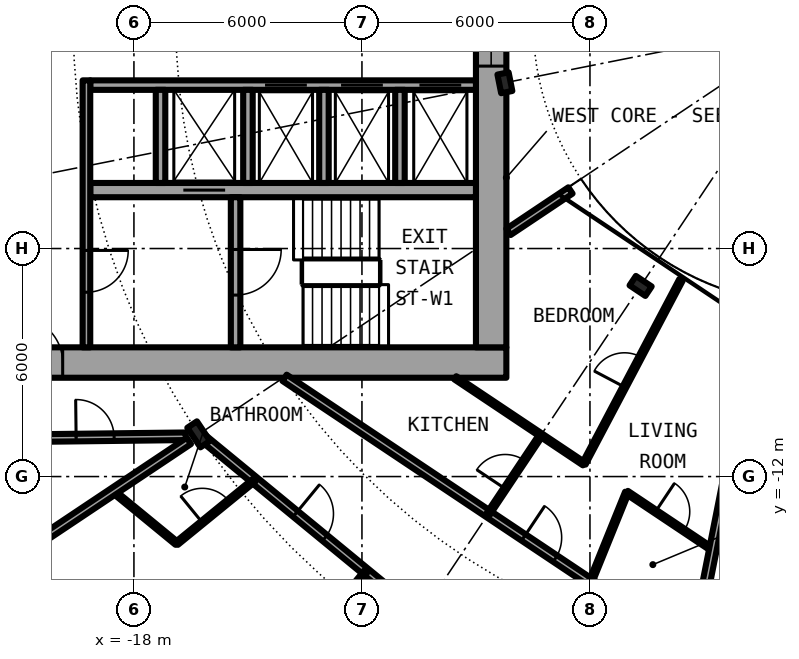
"""IFC4 building model, lengths in metres.
Left out: names, types, materials, properties, quantities, classifications, styles, units other than length and angle.
Written with IfcOpenShell. Run it as: python <this file> out.ifc"""

import sys

from ifc_helpers import new_model, si_unit, direction, frame, frame_2d, origin, origin_2d, place, context, subcontext, project, spatial, rectangle, i_section, extrude, element, fill, save


model = new_model("IFC4")
c1 = context("Model", 3, precision=1e-05, world=origin(), true_north=direction((0.0, 1.0)))
c2 = subcontext(c1, "Body", "Model", "MODEL_VIEW")
j1 = project(units=[si_unit("LENGTHUNIT", "METRE"), si_unit("PLANEANGLEUNIT", "RADIAN")], contexts=[c1])
p1 = place(None, origin())
s1 = spatial("IfcSite", under=j1, at=p1, CompositionType="ELEMENT")
p2 = place(p1, origin())
s2 = spatial("IfcBuilding", under=s1, at=p2, CompositionType="ELEMENT")
p3 = place(p2, frame((0.0, 0.0, 35.0)))
s3 = spatial("IfcBuildingStorey", under=s2, at=p3, CompositionType="ELEMENT", Elevation=35.0)
p4 = place(p3, frame((-16.297, -10.889, 0.0), z_axis=(0.0, 0.0, 1.0), x_axis=(-0.831469612303, -0.55557023302, 0.0)))
e1 = element("IfcColumn", 1, at=p4, inside=s3, PredefinedType="COLUMN", context=c2, shape_type="SweptSolid", body=[
    extrude(i_section(OverallWidth=0.305, OverallDepth=0.62, WebThickness=0.021, FlangeThickness=0.04, FilletRadius=0.027, at=origin_2d()), origin(), (0.0, 0.0, 1.0), 3.05),
])
for number, where, z_axis, x_axis in (
    (2, (-8.239, -1.639, 0.0), (0.0, 0.0, 1.0), (-0.981, -0.195, 0.0)),
    (3, (-4.667, -6.984, 0.0), (0.0, 0.0, 1.0), (-0.556, -0.831, 0.0)),
):
    element("IfcColumn", number, at=place(p3, frame(where, z_axis=z_axis, x_axis=x_axis)), inside=s3, PredefinedType="COLUMN", context=c2, shape_type="SweptSolid", body=[
        extrude(i_section(OverallWidth=0.3, OverallDepth=0.5, WebThickness=0.014, FlangeThickness=0.028, FilletRadius=0.027, at=origin_2d()), origin(), (0.0, 0.0, 1.0), 3.05),
    ])
p5 = place(p3, frame((-22.4, -9.0, 0.0), z_axis=(0.0, 0.0, 1.0), x_axis=(1.0, 0.0, 0.0)))
e4 = element("IfcWall", 4, at=p5, inside=s3, PredefinedType="SHEAR", context=c2, shape_type="SweptSolid", body=[
    extrude(rectangle(XDim=14.2, YDim=0.8, at=frame_2d((7.1, 0.0))), origin(), (0.0, 0.0, 1.0), 3.05),
])
p6 = place(p5, frame((1.325, 0.0, 0.0)))
e5 = element("IfcOpeningElement", 5, at=p6, cuts=e4, PredefinedType="OPENING", context=c2, shape_type="SweptSolid", body=[
    extrude(rectangle(XDim=1.2, YDim=2.3, at=frame_2d((0.6, 1.15))), frame((0.0, 0.41, 0.0), z_axis=(0.0, -1.0, 0.0), x_axis=(1.0, 0.0, 0.0)), (0.0, 0.0, 1.0), 0.82),
])
p7 = place(p3, frame((-8.6, 8.6, 0.0), z_axis=(0.0, 0.0, 1.0), x_axis=(0.0, -1.0, 0.0)))
e6 = element("IfcWall", 6, at=p7, inside=s3, PredefinedType="SHEAR", context=c2, shape_type="SweptSolid", body=[
    extrude(rectangle(XDim=17.2, YDim=0.8, at=frame_2d((8.6, 0.0))), origin(), (0.0, 0.0, 1.0), 3.05),
])
p8 = place(p7, frame((7.4, 0.0, 0.1)))
e7 = element("IfcOpeningElement", 7, at=p8, cuts=e6, PredefinedType="OPENING", context=c2, shape_type="SweptSolid", body=[
    extrude(rectangle(XDim=2.4, YDim=2.2, at=frame_2d((1.2, 1.1))), frame((0.0, 0.41, 0.0), z_axis=(0.0, -1.0, 0.0), x_axis=(1.0, 0.0, 0.0)), (0.0, 0.0, 1.0), 0.82),
])
p9 = place(p3, frame((-9.0, -1.7, 0.0), z_axis=(0.0, 0.0, 1.0), x_axis=(-1.0, 0.0, 0.0)))
e8 = element("IfcWall", 8, at=p9, inside=s3, PredefinedType="SHEAR", context=c2, shape_type="SweptSolid", body=[
    extrude(rectangle(XDim=10.15, YDim=0.25, at=frame_2d((5.075, 0.0))), origin(), (0.0, 0.0, 1.0), 3.05),
])
p10 = place(p9, frame((0.387, 0.0, 0.0)))
e9 = element("IfcOpeningElement", 9, at=p10, cuts=e8, PredefinedType="OPENING", context=c2, shape_type="SweptSolid", body=[
    extrude(rectangle(XDim=1.1, YDim=2.3, at=frame_2d((0.55, 1.15))), frame((0.0, 0.135, 0.0), z_axis=(0.0, -1.0, 0.0), x_axis=(1.0, 0.0, 0.0)), (0.0, 0.0, 1.0), 0.27),
])
p11 = place(p9, frame((2.45, 0.0, 0.0)))
e10 = element("IfcOpeningElement", 10, at=p11, cuts=e8, PredefinedType="OPENING", context=c2, shape_type="SweptSolid", body=[
    extrude(rectangle(XDim=1.1, YDim=2.3, at=frame_2d((0.55, 1.15))), frame((0.0, 0.135, 0.0), z_axis=(0.0, -1.0, 0.0), x_axis=(1.0, 0.0, 0.0)), (0.0, 0.0, 1.0), 0.27),
])
p12 = place(p9, frame((4.45, 0.0, 0.0)))
e11 = element("IfcOpeningElement", 11, at=p12, cuts=e8, PredefinedType="OPENING", context=c2, shape_type="SweptSolid", body=[
    extrude(rectangle(XDim=1.1, YDim=2.3, at=frame_2d((0.55, 1.15))), frame((0.0, 0.135, 0.0), z_axis=(0.0, -1.0, 0.0), x_axis=(1.0, 0.0, 0.0)), (0.0, 0.0, 1.0), 0.27),
])
p13 = place(p3, frame((-9.0, -4.462, 0.0), z_axis=(0.0, 0.0, 1.0), x_axis=(-1.0, 0.0, 0.0)))
e12 = element("IfcWall", 12, at=p13, inside=s3, PredefinedType="SHEAR", context=c2, shape_type="SweptSolid", body=[
    extrude(rectangle(XDim=10.15, YDim=0.375, at=frame_2d((5.075, 0.0))), origin(), (0.0, 0.0, 1.0), 3.05),
])
p14 = place(p13, frame((6.6, 0.0, 0.0)))
e13 = element("IfcOpeningElement", 13, at=p14, cuts=e12, PredefinedType="OPENING", context=c2, shape_type="SweptSolid", body=[
    extrude(rectangle(XDim=1.1, YDim=2.3, at=frame_2d((0.55, 1.15))), frame((0.0, 0.198, 0.0), z_axis=(0.0, -1.0, 0.0), x_axis=(1.0, 0.0, 0.0)), (0.0, 0.0, 1.0), 0.395),
])
p15 = place(p3, frame((-15.325, -4.65, 0.0), z_axis=(0.0, 0.0, 1.0), x_axis=(0.0, -1.0, 0.0)))
e14 = element("IfcWall", 14, at=p15, inside=s3, PredefinedType="SHEAR", context=c2, shape_type="SweptSolid", body=[
    extrude(rectangle(XDim=3.95, YDim=0.25, at=frame_2d((1.975, 0.0))), origin(), (0.0, 0.0, 1.0), 3.05),
])
p16 = place(p15, frame((1.375, 0.0, 0.0)))
e15 = element("IfcOpeningElement", 15, at=p16, cuts=e14, PredefinedType="OPENING", context=c2, shape_type="SweptSolid", body=[
    extrude(rectangle(XDim=1.2, YDim=2.3, at=frame_2d((0.6, 1.15))), frame((0.0, 0.135, 0.0), z_axis=(0.0, -1.0, 0.0), x_axis=(1.0, 0.0, 0.0)), (0.0, 0.0, 1.0), 0.27),
])
for number, where, z_axis, x_axis in (
    (16, (-15.0, -1.825, 0.0), (0.0, 0.0, 1.0), (0.0, -1.0, 0.0)),
    (17, (-17.3, -1.825, 0.0), (0.0, 0.0, 1.0), (0.0, -1.0, 0.0)),
):
    element("IfcWall", number, at=place(p3, frame(where, z_axis=z_axis, x_axis=x_axis)), inside=s3, PredefinedType="SOLIDWALL", context=c2, shape_type="SweptSolid", body=[
        extrude(rectangle(XDim=2.45, YDim=0.25, at=frame_2d((1.225, 0.0))), origin(), (0.0, 0.0, 1.0), 2.7),
    ])
p17 = place(p3, frame((-19.25, -1.575, 0.0), z_axis=(0.0, 0.0, 1.0), x_axis=(0.0, -1.0, 0.0)))
e18 = element("IfcWall", 18, at=p17, inside=s3, PredefinedType="SOLIDWALL", context=c2, shape_type="SweptSolid", body=[
    extrude(rectangle(XDim=7.025, YDim=0.2, at=frame_2d((3.513, 0.0))), origin(), (0.0, 0.0, 1.0), 2.7),
])
p18 = place(p17, frame((4.475, 0.0, 0.0)))
e19 = element("IfcOpeningElement", 19, at=p18, cuts=e18, PredefinedType="OPENING", context=c2, shape_type="SweptSolid", body=[
    extrude(rectangle(XDim=1.1, YDim=2.3, at=frame_2d((0.55, 1.15))), frame((0.0, 0.11, 0.0), z_axis=(0.0, -1.0, 0.0), x_axis=(1.0, 0.0, 0.0)), (0.0, 0.0, 1.0), 0.22),
])
for number, where, z_axis, x_axis in (
    (20, (-11.0, -1.825, 0.0), (0.0, 0.0, 1.0), (0.0, -1.0, 0.0)),
    (21, (-13.0, -1.825, 0.0), (0.0, 0.0, 1.0), (0.0, -1.0, 0.0)),
):
    element("IfcWall", number, at=place(p3, frame(where, z_axis=z_axis, x_axis=x_axis)), inside=s3, PredefinedType="SOLIDWALL", context=c2, shape_type="SweptSolid", body=[
        extrude(rectangle(XDim=2.45, YDim=0.25, at=frame_2d((1.225, 0.0))), origin(), (0.0, 0.0, 1.0), 2.7),
    ])
p19 = place(p3, frame((-18.542, -12.389, 0.0), z_axis=(0.0, 0.0, 1.0), x_axis=(0.772948171844, -0.634469166818, 0.0)))
e22 = element("IfcWall", 22, at=p19, inside=s3, PredefinedType="PARTITIONING", context=c2, shape_type="SweptSolid", body=[
    extrude(rectangle(XDim=2.158, YDim=0.1, at=frame_2d((1.079, 0.0))), origin(), (0.0, 0.0, 1.0), 2.7),
])
p20 = place(p3, frame((-16.173, -10.99, 0.0), z_axis=(0.0, 0.0, 1.0), x_axis=(0.772704887747, -0.634765434198, 0.0)))
e23 = element("IfcWall", 23, at=p20, inside=s3, PredefinedType="PARTITIONING", context=c2, shape_type="SweptSolid", body=[
    extrude(rectangle(XDim=11.209, YDim=0.2, at=frame_2d((5.604, 0.0))), origin(), (0.0, 0.0, 1.0), 2.38),
])
p21 = place(p20, frame((3.137, 0.0, 0.0)))
e24 = element("IfcOpeningElement", 24, at=p21, cuts=e23, PredefinedType="OPENING", context=c2, shape_type="SweptSolid", body=[
    extrude(rectangle(XDim=1.0, YDim=2.3, at=frame_2d((0.5, 1.15))), frame((0.0, 0.11, 0.0), z_axis=(0.0, -1.0, 0.0), x_axis=(1.0, 0.0, 0.0)), (0.0, 0.0, 1.0), 0.22),
])
p22 = place(p3, frame((-14.036, -9.402, 0.0), z_axis=(0.0, 0.0, 1.0), x_axis=(0.831561346449, -0.555432918625, 0.0)))
e25 = element("IfcWall", 25, at=p22, inside=s3, PredefinedType="PARTITIONING", context=c2, shape_type="SweptSolid", body=[
    extrude(rectangle(XDim=12.914, YDim=0.2, at=frame_2d((6.457, 0.0))), origin(), (0.0, 0.0, 1.0), 2.7),
])
p23 = place(p22, frame((7.566, 0.0, 0.0)))
e26 = element("IfcOpeningElement", 26, at=p23, cuts=e25, PredefinedType="OPENING", context=c2, shape_type="SweptSolid", body=[
    extrude(rectangle(XDim=1.0, YDim=2.3, at=frame_2d((0.5, 1.15))), frame((0.0, 0.11, 0.0), z_axis=(0.0, -1.0, 0.0), x_axis=(1.0, 0.0, 0.0)), (0.0, 0.0, 1.0), 0.22),
])
p24 = place(p3, frame((-2.772, -13.927, 0.0), z_axis=(0.0, 0.0, 1.0), x_axis=(0.995206960104, 0.097791137432, 0.0)))
e27 = element("IfcWall", 27, at=p24, inside=s3, PredefinedType="PARTITIONING", context=c2, shape_type="SweptSolid", body=[
    extrude(rectangle(XDim=4.122, YDim=0.1, at=frame_2d((2.061, 0.0))), origin(), (0.0, 0.0, 1.0), 2.7),
])
p25 = place(p3, frame((-9.545, -9.401, 0.0), z_axis=(0.0, 0.0, 1.0), x_axis=(0.831459707426, -0.555585056429, 0.0)))
e28 = element("IfcWall", 28, at=p25, inside=s3, PredefinedType="PARTITIONING", context=c2, shape_type="SweptSolid", body=[
    extrude(rectangle(XDim=4.073, YDim=0.1, at=frame_2d((2.037, 0.0))), origin(), (0.0, 0.0, 1.0), 2.7),
])
p26 = place(p3, frame((-5.029, -12.418, 0.0), z_axis=(0.0, 0.0, 1.0), x_axis=(0.831538390496, -0.555467285384, 0.0)))
e29 = element("IfcWall", 29, at=p26, inside=s3, PredefinedType="PARTITIONING", context=c2, shape_type="SweptSolid", body=[
    extrude(rectangle(XDim=2.717, YDim=0.1, at=frame_2d((1.358, 0.0))), origin(), (0.0, 0.0, 1.0), 2.7),
])
p27 = place(p26, frame((0.908, 0.0, 0.0)))
e30 = element("IfcOpeningElement", 30, at=p27, cuts=e29, PredefinedType="OPENING", context=c2, shape_type="SweptSolid", body=[
    extrude(rectangle(XDim=0.9, YDim=2.3, at=frame_2d((0.45, 1.15))), frame((0.0, 0.06, 0.0), z_axis=(0.0, -1.0, 0.0), x_axis=(1.0, 0.0, 0.0)), (0.0, 0.0, 1.0), 0.12),
])
p28 = place(p3, frame((-21.675, -11.0, 0.0), z_axis=(0.0, 0.0, 1.0), x_axis=(0.999928980998, 0.011917758204, 0.0)))
e31 = element("IfcWall", 31, at=p28, inside=s3, PredefinedType="PARTITIONING", context=c2, shape_type="SweptSolid", body=[
    extrude(rectangle(XDim=5.039, YDim=0.2, at=frame_2d((2.52, 0.0))), origin(), (0.0, 0.0, 1.0), 2.7),
])
p29 = place(p28, frame((2.154, 0.0, 0.0)))
e32 = element("IfcOpeningElement", 32, at=p29, cuts=e31, PredefinedType="OPENING", context=c2, shape_type="SweptSolid", body=[
    extrude(rectangle(XDim=1.0, YDim=2.3, at=frame_2d((0.5, 1.15))), frame((0.0, 0.11, 0.0), z_axis=(0.0, -1.0, 0.0), x_axis=(1.0, 0.0, 0.0)), (0.0, 0.0, 1.0), 0.22),
])
p30 = place(p3, frame((-6.513, -4.472, 0.0), z_axis=(0.0, 0.0, 1.0), x_axis=(-0.831417956244, -0.555647533996, 0.0)))
e33 = element("IfcWall", 33, at=p30, inside=s3, PredefinedType="PARTITIONING", context=c2, shape_type="SweptSolid", body=[
    extrude(rectangle(XDim=1.962, YDim=0.2, at=frame_2d((0.981, 0.0))), origin(), (0.0, 0.0, 1.0), 2.7),
])
p31 = place(p3, frame((-22.596, -15.097, 0.0), z_axis=(0.0, 0.0, 1.0), x_axis=(0.831610607528, 0.555359160765, 0.0)))
e34 = element("IfcWall", 34, at=p31, inside=s3, PredefinedType="PARTITIONING", context=c2, shape_type="SweptSolid", body=[
    extrude(rectangle(XDim=7.265, YDim=0.2, at=frame_2d((3.633, 0.0))), origin(), (0.0, 0.0, 1.0), 2.7),
])
p32 = place(p3, frame((-17.24, -21.007, 0.0), z_axis=(0.0, 0.0, 1.0), x_axis=(0.634396151441, 0.77300810024, 0.0)))
e35 = element("IfcWall", 35, at=p32, inside=s3, PredefinedType="PARTITIONING", context=c2, shape_type="SweptSolid", body=[
    extrude(rectangle(XDim=8.419, YDim=0.1, at=frame_2d((4.209, 0.0))), origin(), (0.0, 0.0, 1.0), 2.7),
])
p33 = place(p32, frame((6.679, 0.0, 0.0)))
e36 = element("IfcOpeningElement", 36, at=p33, cuts=e35, PredefinedType="OPENING", context=c2, shape_type="SweptSolid", body=[
    extrude(rectangle(XDim=0.9, YDim=2.3, at=frame_2d((0.45, 1.15))), frame((0.0, 0.06, 0.0), z_axis=(0.0, -1.0, 0.0), x_axis=(1.0, 0.0, 0.0)), (0.0, 0.0, 1.0), 0.12),
])
p34 = place(p32, frame((2.468, 0.0, 0.0)))
e37 = element("IfcOpeningElement", 37, at=p34, cuts=e35, PredefinedType="OPENING", context=c2, shape_type="SweptSolid", body=[
    extrude(rectangle(XDim=0.9, YDim=2.3, at=frame_2d((0.45, 1.15))), frame((0.0, 0.06, 0.0), z_axis=(0.0, -1.0, 0.0), x_axis=(1.0, 0.0, 0.0)), (0.0, 0.0, 1.0), 0.12),
])
p35 = place(p3, frame((-16.874, -13.758, 0.0), z_axis=(0.0, 0.0, 1.0), x_axis=(0.774979608522, 0.631986239072, 0.0)))
e38 = element("IfcWall", 38, at=p35, inside=s3, PredefinedType="PARTITIONING", context=c2, shape_type="SweptSolid", body=[
    extrude(rectangle(XDim=2.636, YDim=0.1, at=frame_2d((1.318, 0.0))), origin(), (0.0, 0.0, 1.0), 2.7),
])
p36 = place(p35, frame((0.868, 0.0, 0.0)))
e39 = element("IfcOpeningElement", 39, at=p36, cuts=e38, PredefinedType="OPENING", context=c2, shape_type="SweptSolid", body=[
    extrude(rectangle(XDim=0.9, YDim=2.3, at=frame_2d((0.45, 1.15))), frame((0.0, 0.06, 0.0), z_axis=(0.0, -1.0, 0.0), x_axis=(1.0, 0.0, 0.0)), (0.0, 0.0, 1.0), 0.12),
])
p37 = place(p3, frame((-8.674, -12.982, 0.0), z_axis=(0.0, 0.0, 1.0), x_axis=(0.555355163998, 0.831613276602, 0.0)))
e40 = element("IfcWall", 40, at=p37, inside=s3, PredefinedType="PARTITIONING", context=c2, shape_type="SweptSolid", body=[
    extrude(rectangle(XDim=2.494, YDim=0.1, at=frame_2d((1.247, 0.0))), origin(), (0.0, 0.0, 1.0), 2.7),
])
p38 = place(p37, frame((0.797, 0.0, 0.0)))
e41 = element("IfcOpeningElement", 41, at=p38, cuts=e40, PredefinedType="OPENING", context=c2, shape_type="SweptSolid", body=[
    extrude(rectangle(XDim=0.9, YDim=2.3, at=frame_2d((0.45, 1.15))), frame((0.0, 0.06, 0.0), z_axis=(0.0, -1.0, 0.0), x_axis=(1.0, 0.0, 0.0)), (0.0, 0.0, 1.0), 0.12),
])
p39 = place(p3, frame((-6.159, -11.663, 0.0), z_axis=(0.0, 0.0, 1.0), x_axis=(0.466976820365, 0.884269556889, 0.0)))
e42 = element("IfcWall", 42, at=p39, inside=s3, PredefinedType="PARTITIONING", context=c2, shape_type="SweptSolid", body=[
    extrude(rectangle(XDim=5.469, YDim=0.1, at=frame_2d((2.735, 0.0))), origin(), (0.0, 0.0, 1.0), 2.7),
])
p40 = place(p39, frame((2.284, 0.0, 0.0)))
e43 = element("IfcOpeningElement", 43, at=p40, cuts=e42, PredefinedType="OPENING", context=c2, shape_type="SweptSolid", body=[
    extrude(rectangle(XDim=0.9, YDim=2.3, at=frame_2d((0.45, 1.15))), frame((0.0, 0.06, 0.0), z_axis=(0.0, -1.0, 0.0), x_axis=(1.0, 0.0, 0.0)), (0.0, 0.0, 1.0), 0.12),
])
p41 = place(p3, frame((-5.986, -14.779, 0.0), z_axis=(0.0, 0.0, 1.0), x_axis=(0.375649498413, 0.926761811008, 0.0)))
e44 = element("IfcWall", 44, at=p41, inside=s3, PredefinedType="PARTITIONING", context=c2, shape_type="SweptSolid", body=[
    extrude(rectangle(XDim=2.548, YDim=0.1, at=frame_2d((1.274, 0.0))), origin(), (0.0, 0.0, 1.0), 2.7),
])
p42 = place(p3, frame((-3.292, -16.576, 0.0), z_axis=(0.0, 0.0, 1.0), x_axis=(0.194683825545, 0.980866050015, 0.0)))
e45 = element("IfcWall", 45, at=p42, inside=s3, PredefinedType="PARTITIONING", context=c2, shape_type="SweptSolid", body=[
    extrude(rectangle(XDim=9.179, YDim=0.2, at=frame_2d((4.59, 0.0))), origin(), (0.0, 0.0, 1.0), 2.7),
])
p43 = place(p10, origin())
e46 = element("IfcDoor", 46, at=p43, inside=s3, OperationType="DOUBLE_DOOR_SLIDING", PredefinedType="DOOR", context=c2, shape_type="SweptSolid", body=[
    extrude(rectangle(XDim=1.1, YDim=2.3, at=frame_2d((0.55, 1.15))), frame((0.0, 0.025, 0.0), z_axis=(0.0, -1.0, 0.0), x_axis=(1.0, 0.0, 0.0)), (0.0, 0.0, 1.0), 0.05),
])
fill(e9, e46)
p44 = place(p11, origin())
e47 = element("IfcDoor", 47, at=p44, inside=s3, OperationType="DOUBLE_DOOR_SLIDING", PredefinedType="DOOR", context=c2, shape_type="SweptSolid", body=[
    extrude(rectangle(XDim=1.1, YDim=2.3, at=frame_2d((0.55, 1.15))), frame((0.0, 0.025, 0.0), z_axis=(0.0, -1.0, 0.0), x_axis=(1.0, 0.0, 0.0)), (0.0, 0.0, 1.0), 0.05),
])
fill(e10, e47)
p45 = place(p12, origin())
e48 = element("IfcDoor", 48, at=p45, inside=s3, OperationType="DOUBLE_DOOR_SLIDING", PredefinedType="DOOR", context=c2, shape_type="SweptSolid", body=[
    extrude(rectangle(XDim=1.1, YDim=2.3, at=frame_2d((0.55, 1.15))), frame((0.0, 0.025, 0.0), z_axis=(0.0, -1.0, 0.0), x_axis=(1.0, 0.0, 0.0)), (0.0, 0.0, 1.0), 0.05),
])
fill(e11, e48)
p46 = place(p14, origin())
e49 = element("IfcDoor", 49, at=p46, inside=s3, OperationType="DOUBLE_DOOR_SLIDING", PredefinedType="DOOR", context=c2, shape_type="SweptSolid", body=[
    extrude(rectangle(XDim=1.1, YDim=2.3, at=frame_2d((0.55, 1.15))), frame((0.0, 0.025, 0.0), z_axis=(0.0, -1.0, 0.0), x_axis=(1.0, 0.0, 0.0)), (0.0, 0.0, 1.0), 0.05),
])
fill(e13, e49)
p47 = place(p16, origin())
e50 = element("IfcDoor", 50, at=p47, inside=s3, OperationType="SINGLE_SWING_LEFT", PredefinedType="DOOR", context=c2, shape_type="SweptSolid", body=[
    extrude(rectangle(XDim=1.2, YDim=2.3, at=frame_2d((0.6, 1.15))), frame((0.0, 0.025, 0.0), z_axis=(0.0, -1.0, 0.0), x_axis=(1.0, 0.0, 0.0)), (0.0, 0.0, 1.0), 0.05),
])
fill(e15, e50)
p48 = place(p18, origin())
e51 = element("IfcDoor", 51, at=p48, inside=s3, OperationType="SINGLE_SWING_LEFT", PredefinedType="DOOR", context=c2, shape_type="SweptSolid", body=[
    extrude(rectangle(XDim=1.1, YDim=2.3, at=frame_2d((0.55, 1.15))), frame((0.0, 0.025, 0.0), z_axis=(0.0, -1.0, 0.0), x_axis=(1.0, 0.0, 0.0)), (0.0, 0.0, 1.0), 0.05),
])
fill(e19, e51)
p49 = place(p6, origin())
e52 = element("IfcDoor", 52, at=p49, inside=s3, OperationType="SINGLE_SWING_RIGHT", PredefinedType="DOOR", context=c2, shape_type="SweptSolid", body=[
    extrude(rectangle(XDim=1.2, YDim=2.3, at=frame_2d((0.6, 1.15))), frame((0.0, 0.025, 0.0), z_axis=(0.0, -1.0, 0.0), x_axis=(1.0, 0.0, 0.0)), (0.0, 0.0, 1.0), 0.05),
])
fill(e5, e52)
p50 = place(p8, origin())
e53 = element("IfcWindow", 53, at=p50, inside=s3, PartitioningType="SINGLE_PANEL", PredefinedType="WINDOW", context=c2, shape_type="SweptSolid", body=[
    extrude(rectangle(XDim=2.4, YDim=2.2, at=frame_2d((1.2, 1.1))), frame((0.0, 0.03, 0.0), z_axis=(0.0, -1.0, 0.0), x_axis=(1.0, 0.0, 0.0)), (0.0, 0.0, 1.0), 0.06),
])
fill(e7, e53)
p51 = place(p21, origin())
e54 = element("IfcDoor", 54, at=p51, inside=s3, OperationType="SINGLE_SWING_LEFT", PredefinedType="DOOR", context=c2, shape_type="SweptSolid", body=[
    extrude(rectangle(XDim=1.0, YDim=2.3, at=frame_2d((0.5, 1.15))), frame((0.0, 0.025, 0.0), z_axis=(0.0, -1.0, 0.0), x_axis=(1.0, 0.0, 0.0)), (0.0, 0.0, 1.0), 0.05),
])
fill(e24, e54)
p52 = place(p36, origin())
e55 = element("IfcDoor", 55, at=p52, inside=s3, OperationType="SINGLE_SWING_LEFT", PredefinedType="DOOR", context=c2, shape_type="SweptSolid", body=[
    extrude(rectangle(XDim=0.9, YDim=2.3, at=frame_2d((0.45, 1.15))), frame((0.0, 0.025, 0.0), z_axis=(0.0, -1.0, 0.0), x_axis=(1.0, 0.0, 0.0)), (0.0, 0.0, 1.0), 0.05),
])
fill(e39, e55)
p53 = place(p23, origin())
e56 = element("IfcDoor", 56, at=p53, inside=s3, OperationType="SINGLE_SWING_RIGHT", PredefinedType="DOOR", context=c2, shape_type="SweptSolid", body=[
    extrude(rectangle(XDim=1.0, YDim=2.3, at=frame_2d((0.5, 1.15))), frame((0.0, 0.025, 0.0), z_axis=(0.0, -1.0, 0.0), x_axis=(1.0, 0.0, 0.0)), (0.0, 0.0, 1.0), 0.05),
])
fill(e26, e56)
p54 = place(p27, origin())
e57 = element("IfcDoor", 57, at=p54, inside=s3, OperationType="SINGLE_SWING_LEFT", PredefinedType="DOOR", context=c2, shape_type="SweptSolid", body=[
    extrude(rectangle(XDim=0.9, YDim=2.3, at=frame_2d((0.45, 1.15))), frame((0.0, 0.025, 0.0), z_axis=(0.0, -1.0, 0.0), x_axis=(1.0, 0.0, 0.0)), (0.0, 0.0, 1.0), 0.05),
])
fill(e30, e57)
p55 = place(p38, origin())
e58 = element("IfcDoor", 58, at=p55, inside=s3, OperationType="SINGLE_SWING_RIGHT", PredefinedType="DOOR", context=c2, shape_type="SweptSolid", body=[
    extrude(rectangle(XDim=0.9, YDim=2.3, at=frame_2d((0.45, 1.15))), frame((0.0, 0.025, 0.0), z_axis=(0.0, -1.0, 0.0), x_axis=(1.0, 0.0, 0.0)), (0.0, 0.0, 1.0), 0.05),
])
fill(e41, e58)
p56 = place(p40, origin())
e59 = element("IfcDoor", 59, at=p56, inside=s3, OperationType="SINGLE_SWING_LEFT", PredefinedType="DOOR", context=c2, shape_type="SweptSolid", body=[
    extrude(rectangle(XDim=0.9, YDim=2.3, at=frame_2d((0.45, 1.15))), frame((0.0, 0.025, 0.0), z_axis=(0.0, -1.0, 0.0), x_axis=(1.0, 0.0, 0.0)), (0.0, 0.0, 1.0), 0.05),
])
fill(e43, e59)
p57 = place(p29, origin())
e60 = element("IfcDoor", 60, at=p57, inside=s3, OperationType="SINGLE_SWING_RIGHT", PredefinedType="DOOR", context=c2, shape_type="SweptSolid", body=[
    extrude(rectangle(XDim=1.0, YDim=2.3, at=frame_2d((0.5, 1.15))), frame((0.0, 0.025, 0.0), z_axis=(0.0, -1.0, 0.0), x_axis=(1.0, 0.0, 0.0)), (0.0, 0.0, 1.0), 0.05),
])
fill(e32, e60)
save(model, sys.argv[1])
